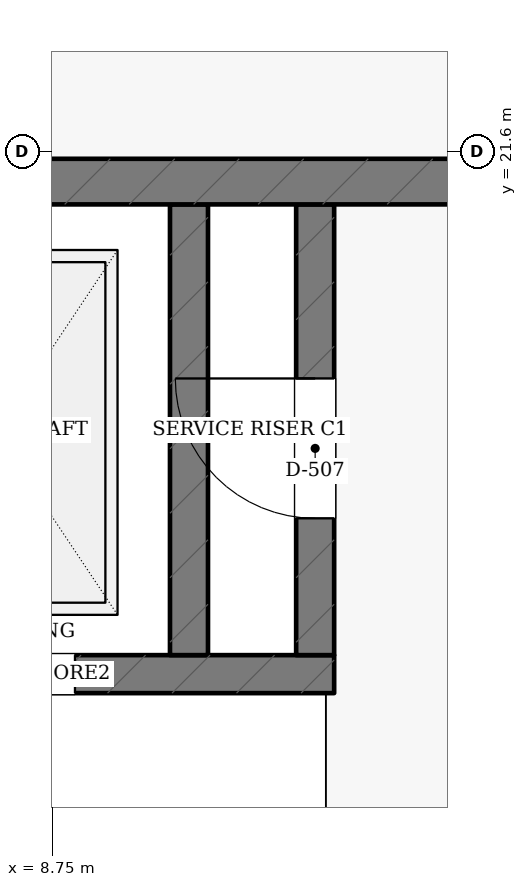
"""IFC4 building model, lengths in metres.
Left out: names, types, materials, properties, quantities, classifications, styles, units other than length and angle.
Written with IfcOpenShell. Run it as: python <this file> out.ifc"""

import sys

from ifc_helpers import new_model, si_unit, direction, frame, frame_2d, origin, place, context, subcontext, project, spatial, rectangle, extrude, element, fill, save


model = new_model("IFC4")
c1 = context("Model", 3, precision=1e-05, world=origin(), true_north=direction((0.0, 1.0)))
c2 = subcontext(c1, "Body", "Model", "MODEL_VIEW")
j1 = project(units=[si_unit("LENGTHUNIT", "METRE"), si_unit("PLANEANGLEUNIT", "RADIAN")], contexts=[c1])
p1 = place(None, origin())
s1 = spatial("IfcSite", under=j1, at=p1, CompositionType="ELEMENT")
p2 = place(p1, origin())
s2 = spatial("IfcBuilding", under=s1, at=p2, CompositionType="ELEMENT")
p3 = place(p2, frame((0.0, 0.0, 5.4)))
s3 = spatial("IfcBuildingStorey", under=s2, at=p3, CompositionType="ELEMENT", Elevation=5.4)
p4 = place(p3, frame((7.025, 18.16, 0.0), z_axis=(0.0, 0.0, 1.0), x_axis=(1.0, 0.0, 0.0)))
e1 = element("IfcWall", 1, at=p4, inside=s3, PredefinedType="SHEAR", context=c2, shape_type="SweptSolid", body=[
    extrude(rectangle(XDim=3.58, YDim=0.25, at=frame_2d((1.79, 0.0))), origin(), (0.0, 0.0, 1.0), 3.55),
])
p5 = place(p4, frame((0.775, 0.0, 0.0)))
e2 = element("IfcOpeningElement", 2, at=p5, cuts=e1, PredefinedType="OPENING", context=c2, shape_type="SweptSolid", body=[
    extrude(rectangle(XDim=1.1, YDim=2.15, at=frame_2d((0.55, 1.075))), frame((0.0, 0.135, 0.0), z_axis=(0.0, -1.0, 0.0), x_axis=(1.0, 0.0, 0.0)), (0.0, 0.0, 1.0), 0.27),
])
p6 = place(p3, frame((9.65, 18.285, 0.0), z_axis=(0.0, 0.0, 1.0), x_axis=(0.0, 1.0, 0.0)))
e3 = element("IfcWall", 3, at=p6, inside=s3, PredefinedType="SHEAR", context=c2, shape_type="SweptSolid", body=[
    extrude(rectangle(XDim=2.965, YDim=0.25, at=frame_2d((1.482, 0.0))), origin(), (0.0, 0.0, 1.0), 3.55),
])
p7 = place(p3, frame((10.48, 18.285, 0.0), z_axis=(0.0, 0.0, 1.0), x_axis=(0.0, 1.0, 0.0)))
e4 = element("IfcWall", 4, at=p7, inside=s3, PredefinedType="SHEAR", context=c2, shape_type="SweptSolid", body=[
    extrude(rectangle(XDim=2.965, YDim=0.25, at=frame_2d((1.482, 0.0))), origin(), (0.0, 0.0, 1.0), 3.55),
])
p8 = place(p7, frame((0.9, 0.0, 0.0)))
e5 = element("IfcOpeningElement", 5, at=p8, cuts=e4, PredefinedType="OPENING", context=c2, shape_type="SweptSolid", body=[
    extrude(rectangle(XDim=0.92, YDim=2.05, at=frame_2d((0.46, 1.025))), frame((0.0, 0.135, 0.0), z_axis=(0.0, -1.0, 0.0), x_axis=(1.0, 0.0, 0.0)), (0.0, 0.0, 1.0), 0.27),
])
p9 = place(p3, frame((0.17, 21.4, 0.0), z_axis=(0.0, 0.0, 1.0), x_axis=(1.0, 0.0, 0.0)))
e6 = element("IfcWall", 6, at=p9, inside=s3, PredefinedType="SHEAR", context=c2, shape_type="SweptSolid", body=[
    extrude(rectangle(XDim=14.23, YDim=0.3, at=frame_2d((7.115, 0.0))), origin(), (0.0, 0.0, 1.0), 3.55),
])
p10 = place(p5, origin())
e7 = element("IfcDoor", 7, at=p10, inside=s3, OperationType="SLIDING_TO_LEFT", PredefinedType="DOOR", context=c2, shape_type="SweptSolid", body=[
    extrude(rectangle(XDim=1.1, YDim=2.15, at=frame_2d((0.55, 1.075))), frame((0.0, 0.025, 0.0), z_axis=(0.0, -1.0, 0.0), x_axis=(1.0, 0.0, 0.0)), (0.0, 0.0, 1.0), 0.05),
])
fill(e2, e7)
p11 = place(p8, origin())
e8 = element("IfcDoor", 8, at=p11, inside=s3, OperationType="SINGLE_SWING_RIGHT", PredefinedType="DOOR", context=c2, shape_type="SweptSolid", body=[
    extrude(rectangle(XDim=0.92, YDim=2.05, at=frame_2d((0.46, 1.025))), frame((0.0, 0.025, 0.0), z_axis=(0.0, -1.0, 0.0), x_axis=(1.0, 0.0, 0.0)), (0.0, 0.0, 1.0), 0.05),
])
fill(e5, e8)
save(model, sys.argv[1])
